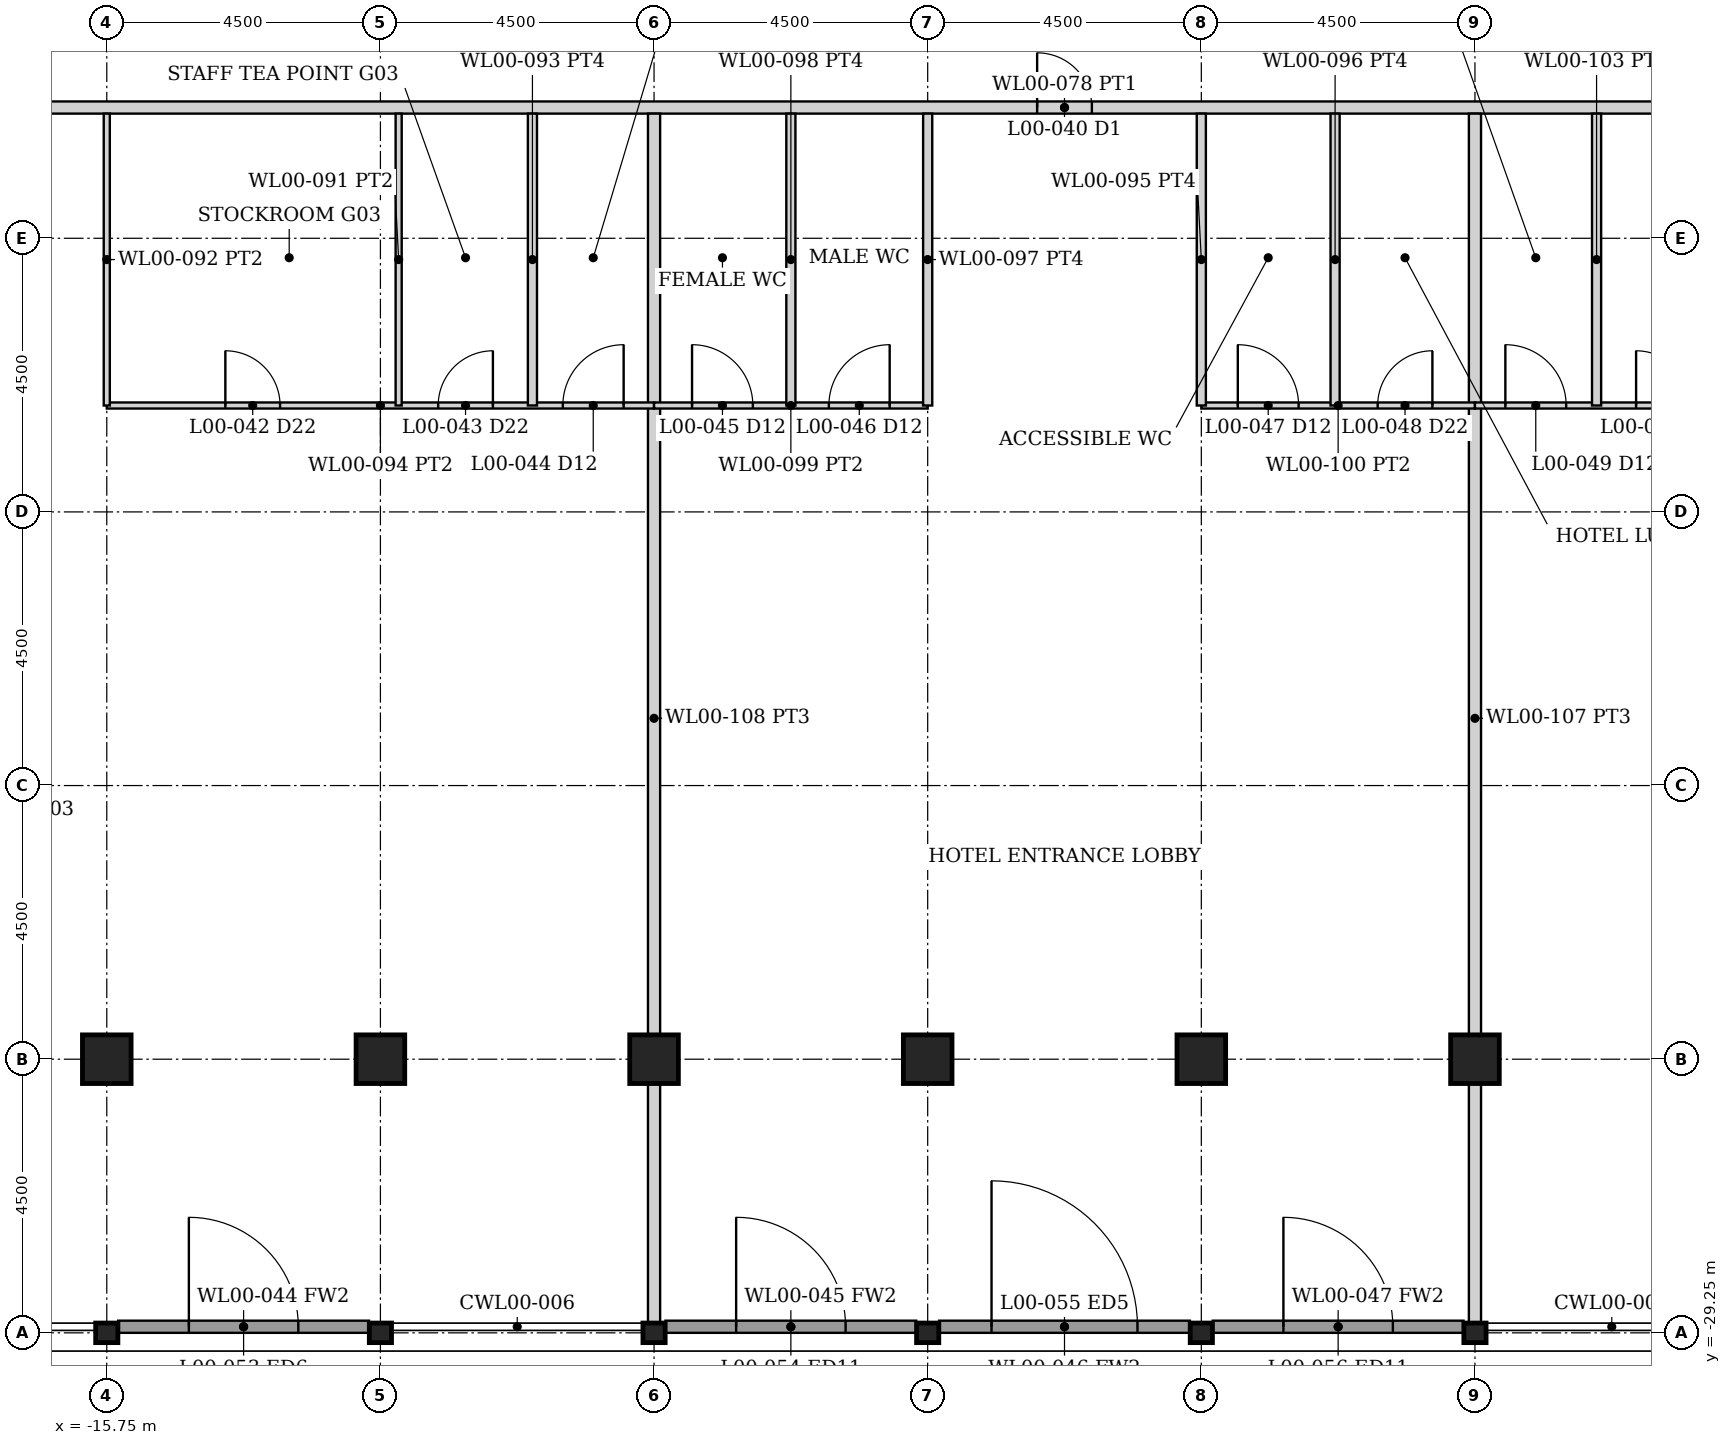
"""IFC4 building model, lengths in metres.
Left out: names, types, materials, properties, quantities, classifications, styles, units other than length and angle.
Written with IfcOpenShell. Run it as: python <this file> out.ifc"""

import sys

from ifc_helpers import new_model, si_unit, direction, frame, frame_2d, origin, origin_2d, place, context, subcontext, project, spatial, rectangle, hollow_rectangle, i_section, extrude, element, fill, save


model = new_model("IFC4")
c1 = context("Model", 3, precision=1e-05, world=origin(), true_north=direction((0.0, 1.0)))
c2 = subcontext(c1, "Body", "Model", "MODEL_VIEW")
j1 = project(units=[si_unit("LENGTHUNIT", "METRE"), si_unit("PLANEANGLEUNIT", "RADIAN")], contexts=[c1])
p1 = place(None, origin())
s1 = spatial("IfcSite", under=j1, at=p1, CompositionType="ELEMENT")
p2 = place(p1, origin())
s2 = spatial("IfcBuilding", under=s1, at=p2, CompositionType="ELEMENT")
p3 = place(p2, origin())
s3 = spatial("IfcBuildingStorey", under=s2, at=p3, CompositionType="ELEMENT", Elevation=0.0)
for number, where, z_axis, x_axis in (
    (1, (-15.75, -24.75, -0.3), (0.0, 0.0, 1.0), (0.0, 1.0, 0.0)),
    (2, (-11.25, -24.75, -0.3), (0.0, 0.0, 1.0), (0.0, 1.0, 0.0)),
    (3, (-6.75, -24.75, -0.3), (0.0, 0.0, 1.0), (0.0, 1.0, 0.0)),
    (4, (-2.25, -24.75, -0.3), (0.0, 0.0, 1.0), (0.0, 1.0, 0.0)),
    (5, (2.25, -24.75, -0.3), (0.0, 0.0, 1.0), (0.0, 1.0, 0.0)),
    (6, (6.75, -24.75, -0.3), (0.0, 0.0, 1.0), (0.0, 1.0, 0.0)),
):
    element("IfcColumn", number, at=place(p3, frame(where, z_axis=z_axis, x_axis=x_axis)), inside=s3, PredefinedType="COLUMN", context=c2, shape_type="SweptSolid", body=[
        extrude(hollow_rectangle(XDim=0.8, YDim=0.8, WallThickness=0.08, at=origin_2d()), origin(), (0.0, 0.0, 1.0), 6.3),
    ])
for number, where, z_axis, x_axis in (
    (7, (-15.75, -29.25, -0.3), (0.0, 0.0, 1.0), (0.0, 1.0, 0.0)),
    (8, (-11.25, -29.25, -0.3), (0.0, 0.0, 1.0), (0.0, 1.0, 0.0)),
    (9, (-6.75, -29.25, -0.3), (0.0, 0.0, 1.0), (0.0, 1.0, 0.0)),
    (10, (-2.25, -29.25, -0.3), (0.0, 0.0, 1.0), (0.0, 1.0, 0.0)),
    (11, (2.25, -29.25, -0.3), (0.0, 0.0, 1.0), (0.0, 1.0, 0.0)),
    (12, (6.75, -29.25, -0.3), (0.0, 0.0, 1.0), (0.0, 1.0, 0.0)),
):
    element("IfcColumn", number, at=place(p3, frame(where, z_axis=z_axis, x_axis=x_axis)), inside=s3, PredefinedType="COLUMN", context=c2, shape_type="SweptSolid", body=[
        extrude(i_section(OverallWidth=0.322, OverallDepth=0.365, WebThickness=0.027, FlangeThickness=0.044, FilletRadius=0.015, at=origin_2d()), origin(), (0.0, 0.0, 1.0), 6.3),
    ])
p4 = place(p3, frame((-15.562, -29.15, 0.0), z_axis=(0.0, 0.0, 1.0), x_axis=(1.0, 0.0, 0.0)))
e13 = element("IfcWall", 13, at=p4, inside=s3, PredefinedType="SOLIDWALL", context=c2, shape_type="SweptSolid", body=[
    extrude(rectangle(XDim=4.125, YDim=0.2, at=frame_2d((2.062, 0.0))), origin(), (0.0, 0.0, 1.0), 5.133),
])
p5 = place(p4, frame((1.162, 0.0, 0.0)))
e14 = element("IfcOpeningElement", 14, at=p5, cuts=e13, PredefinedType="OPENING", context=c2, shape_type="SweptSolid", body=[
    extrude(rectangle(XDim=1.8, YDim=2.7, at=frame_2d((0.9, 1.35))), frame((0.0, 0.11, 0.0), z_axis=(0.0, -1.0, 0.0), x_axis=(1.0, 0.0, 0.0)), (0.0, 0.0, 1.0), 0.22),
])
p6 = place(p3, frame((-6.562, -29.15, 0.0), z_axis=(0.0, 0.0, 1.0), x_axis=(1.0, 0.0, 0.0)))
e15 = element("IfcWall", 15, at=p6, inside=s3, PredefinedType="SOLIDWALL", context=c2, shape_type="SweptSolid", body=[
    extrude(rectangle(XDim=4.125, YDim=0.2, at=frame_2d((2.062, 0.0))), origin(), (0.0, 0.0, 1.0), 5.133),
])
p7 = place(p6, frame((1.162, 0.0, 0.0)))
e16 = element("IfcOpeningElement", 16, at=p7, cuts=e15, PredefinedType="OPENING", context=c2, shape_type="SweptSolid", body=[
    extrude(rectangle(XDim=1.8, YDim=2.7, at=frame_2d((0.9, 1.35))), frame((0.0, 0.11, 0.0), z_axis=(0.0, -1.0, 0.0), x_axis=(1.0, 0.0, 0.0)), (0.0, 0.0, 1.0), 0.22),
])
p8 = place(p3, frame((-2.062, -29.15, 0.0), z_axis=(0.0, 0.0, 1.0), x_axis=(1.0, 0.0, 0.0)))
e17 = element("IfcWall", 17, at=p8, inside=s3, PredefinedType="SOLIDWALL", context=c2, shape_type="SweptSolid", body=[
    extrude(rectangle(XDim=4.125, YDim=0.2, at=frame_2d((2.062, 0.0))), origin(), (0.0, 0.0, 1.0), 5.133),
])
p9 = place(p8, frame((0.862, 0.0, 0.0)))
e18 = element("IfcOpeningElement", 18, at=p9, cuts=e17, PredefinedType="OPENING", context=c2, shape_type="SweptSolid", body=[
    extrude(rectangle(XDim=2.4, YDim=2.7, at=frame_2d((1.2, 1.35))), frame((0.0, 0.11, 0.0), z_axis=(0.0, -1.0, 0.0), x_axis=(1.0, 0.0, 0.0)), (0.0, 0.0, 1.0), 0.22),
])
p10 = place(p3, frame((2.438, -29.15, 0.0), z_axis=(0.0, 0.0, 1.0), x_axis=(1.0, 0.0, 0.0)))
e19 = element("IfcWall", 19, at=p10, inside=s3, PredefinedType="SOLIDWALL", context=c2, shape_type="SweptSolid", body=[
    extrude(rectangle(XDim=4.125, YDim=0.2, at=frame_2d((2.062, 0.0))), origin(), (0.0, 0.0, 1.0), 5.133),
])
p11 = place(p10, frame((1.162, 0.0, 0.0)))
e20 = element("IfcOpeningElement", 20, at=p11, cuts=e19, PredefinedType="OPENING", context=c2, shape_type="SweptSolid", body=[
    extrude(rectangle(XDim=1.8, YDim=2.7, at=frame_2d((0.9, 1.35))), frame((0.0, 0.11, 0.0), z_axis=(0.0, -1.0, 0.0), x_axis=(1.0, 0.0, 0.0)), (0.0, 0.0, 1.0), 0.22),
])
p12 = place(p3, frame((-25.075, -9.1, 0.0), z_axis=(0.0, 0.0, 1.0), x_axis=(1.0, 0.0, 0.0)))
e21 = element("IfcWall", 21, at=p12, inside=s3, PredefinedType="PARTITIONING", context=c2, shape_type="SweptSolid", body=[
    extrude(rectangle(XDim=50.15, YDim=0.2, at=frame_2d((25.075, 0.0))), origin(), (0.0, 0.0, 1.0), 4.829),
])
p13 = place(p12, frame((6.85, 0.0, 0.0)))
e22 = element("IfcOpeningElement", 22, at=p13, cuts=e21, PredefinedType="OPENING", context=c2, shape_type="SweptSolid", body=[
    extrude(rectangle(XDim=0.9, YDim=2.1, at=frame_2d((0.45, 1.05))), frame((0.0, 0.11, 0.0), z_axis=(0.0, -1.0, 0.0), x_axis=(1.0, 0.0, 0.0)), (0.0, 0.0, 1.0), 0.22),
])
p14 = place(p12, frame((24.625, 0.0, 0.0)))
e23 = element("IfcOpeningElement", 23, at=p14, cuts=e21, PredefinedType="OPENING", context=c2, shape_type="SweptSolid", body=[
    extrude(rectangle(XDim=0.9, YDim=2.1, at=frame_2d((0.45, 1.05))), frame((0.0, 0.11, 0.0), z_axis=(0.0, -1.0, 0.0), x_axis=(1.0, 0.0, 0.0)), (0.0, 0.0, 1.0), 0.22),
])
p15 = place(p12, frame((42.4, 0.0, 0.0)))
e24 = element("IfcOpeningElement", 24, at=p15, cuts=e21, PredefinedType="OPENING", context=c2, shape_type="SweptSolid", body=[
    extrude(rectangle(XDim=0.9, YDim=2.1, at=frame_2d((0.45, 1.05))), frame((0.0, 0.11, 0.0), z_axis=(0.0, -1.0, 0.0), x_axis=(1.0, 0.0, 0.0)), (0.0, 0.0, 1.0), 0.22),
])
for number, where, z_axis, x_axis in (
    (25, (-6.75, -29.089, 0.0), (0.0, 0.0, 1.0), (0.0, 1.0, 0.0)),
    (26, (6.75, -29.089, 0.0), (0.0, 0.0, 1.0), (0.0, 1.0, 0.0)),
):
    element("IfcWall", number, at=place(p3, frame(where, z_axis=z_axis, x_axis=x_axis)), inside=s3, PredefinedType="PARTITIONING", context=c2, shape_type="SweptSolid", body=[
        extrude(rectangle(XDim=19.889, YDim=0.2, at=frame_2d((9.944, 0.0))), origin(), (0.0, 0.0, 1.0), 4.829),
    ])
p16 = place(p3, frame((-15.75, -14.0, 0.0), z_axis=(0.0, 0.0, 1.0), x_axis=(1.0, 0.0, 0.0)))
e27 = element("IfcWall", 27, at=p16, inside=s3, PredefinedType="PARTITIONING", context=c2, shape_type="SweptSolid", body=[
    extrude(rectangle(XDim=9.0, YDim=0.1, at=frame_2d((4.5, 0.0))), origin(), (0.0, 0.0, 1.0), 4.829),
])
p17 = place(p16, frame((1.95, 0.0, 0.0)))
e28 = element("IfcOpeningElement", 28, at=p17, cuts=e27, PredefinedType="OPENING", context=c2, shape_type="SweptSolid", body=[
    extrude(rectangle(XDim=0.9, YDim=2.1, at=frame_2d((0.45, 1.05))), frame((0.0, 0.06, 0.0), z_axis=(0.0, -1.0, 0.0), x_axis=(1.0, 0.0, 0.0)), (0.0, 0.0, 1.0), 0.12),
])
p18 = place(p16, frame((5.45, 0.0, 0.0)))
e29 = element("IfcOpeningElement", 29, at=p18, cuts=e27, PredefinedType="OPENING", context=c2, shape_type="SweptSolid", body=[
    extrude(rectangle(XDim=0.9, YDim=2.1, at=frame_2d((0.45, 1.05))), frame((0.0, 0.06, 0.0), z_axis=(0.0, -1.0, 0.0), x_axis=(1.0, 0.0, 0.0)), (0.0, 0.0, 1.0), 0.12),
])
p19 = place(p16, frame((7.5, 0.0, 0.0)))
e30 = element("IfcOpeningElement", 30, at=p19, cuts=e27, PredefinedType="OPENING", context=c2, shape_type="SweptSolid", body=[
    extrude(rectangle(XDim=1.0, YDim=2.1, at=frame_2d((0.5, 1.05))), frame((0.0, 0.06, 0.0), z_axis=(0.0, -1.0, 0.0), x_axis=(1.0, 0.0, 0.0)), (0.0, 0.0, 1.0), 0.12),
])
for number, where, z_axis, x_axis in (
    (31, (-15.75, -14.0, 0.0), (0.0, 0.0, 1.0), (0.0, 1.0, 0.0)),
    (32, (-10.95, -14.0, 0.0), (0.0, 0.0, 1.0), (0.0, 1.0, 0.0)),
):
    element("IfcWall", number, at=place(p3, frame(where, z_axis=z_axis, x_axis=x_axis)), inside=s3, PredefinedType="PARTITIONING", context=c2, shape_type="SweptSolid", body=[
        extrude(rectangle(XDim=4.8, YDim=0.1, at=frame_2d((2.4, 0.0))), origin(), (0.0, 0.0, 1.0), 4.829),
    ])
p20 = place(p3, frame((-8.75, -14.0, 0.0), z_axis=(0.0, 0.0, 1.0), x_axis=(0.0, 1.0, 0.0)))
e33 = element("IfcWall", 33, at=p20, inside=s3, PredefinedType="PARTITIONING", context=c2, shape_type="SweptSolid", body=[
    extrude(rectangle(XDim=4.8, YDim=0.15, at=frame_2d((2.4, 0.0))), origin(), (0.0, 0.0, 1.0), 4.829),
])
p21 = place(p3, frame((-6.75, -14.0, 0.0), z_axis=(0.0, 0.0, 1.0), x_axis=(1.0, 0.0, 0.0)))
e34 = element("IfcWall", 34, at=p21, inside=s3, PredefinedType="PARTITIONING", context=c2, shape_type="SweptSolid", body=[
    extrude(rectangle(XDim=4.5, YDim=0.1, at=frame_2d((2.25, 0.0))), origin(), (0.0, 0.0, 1.0), 4.829),
])
p22 = place(p21, frame((0.625, 0.0, 0.0)))
e35 = element("IfcOpeningElement", 35, at=p22, cuts=e34, PredefinedType="OPENING", context=c2, shape_type="SweptSolid", body=[
    extrude(rectangle(XDim=1.0, YDim=2.1, at=frame_2d((0.5, 1.05))), frame((0.0, 0.06, 0.0), z_axis=(0.0, -1.0, 0.0), x_axis=(1.0, 0.0, 0.0)), (0.0, 0.0, 1.0), 0.12),
])
p23 = place(p21, frame((2.875, 0.0, 0.0)))
e36 = element("IfcOpeningElement", 36, at=p23, cuts=e34, PredefinedType="OPENING", context=c2, shape_type="SweptSolid", body=[
    extrude(rectangle(XDim=1.0, YDim=2.1, at=frame_2d((0.5, 1.05))), frame((0.0, 0.06, 0.0), z_axis=(0.0, -1.0, 0.0), x_axis=(1.0, 0.0, 0.0)), (0.0, 0.0, 1.0), 0.12),
])
p24 = place(p3, frame((2.25, -14.0, 0.0), z_axis=(0.0, 0.0, 1.0), x_axis=(1.0, 0.0, 0.0)))
e37 = element("IfcWall", 37, at=p24, inside=s3, PredefinedType="PARTITIONING", context=c2, shape_type="SweptSolid", body=[
    extrude(rectangle(XDim=4.5, YDim=0.1, at=frame_2d((2.25, 0.0))), origin(), (0.0, 0.0, 1.0), 4.829),
])
p25 = place(p24, frame((0.6, 0.0, 0.0)))
e38 = element("IfcOpeningElement", 38, at=p25, cuts=e37, PredefinedType="OPENING", context=c2, shape_type="SweptSolid", body=[
    extrude(rectangle(XDim=1.0, YDim=2.1, at=frame_2d((0.5, 1.05))), frame((0.0, 0.06, 0.0), z_axis=(0.0, -1.0, 0.0), x_axis=(1.0, 0.0, 0.0)), (0.0, 0.0, 1.0), 0.12),
])
p26 = place(p24, frame((2.9, 0.0, 0.0)))
e39 = element("IfcOpeningElement", 39, at=p26, cuts=e37, PredefinedType="OPENING", context=c2, shape_type="SweptSolid", body=[
    extrude(rectangle(XDim=0.9, YDim=2.1, at=frame_2d((0.45, 1.05))), frame((0.0, 0.06, 0.0), z_axis=(0.0, -1.0, 0.0), x_axis=(1.0, 0.0, 0.0)), (0.0, 0.0, 1.0), 0.12),
])
for number, where, z_axis, x_axis in (
    (40, (-4.5, -14.0, 0.0), (0.0, 0.0, 1.0), (0.0, 1.0, 0.0)),
    (41, (-2.25, -14.0, 0.0), (0.0, 0.0, 1.0), (0.0, 1.0, 0.0)),
    (42, (2.25, -14.0, 0.0), (0.0, 0.0, 1.0), (0.0, 1.0, 0.0)),
    (43, (4.45, -14.0, 0.0), (0.0, 0.0, 1.0), (0.0, 1.0, 0.0)),
):
    element("IfcWall", number, at=place(p3, frame(where, z_axis=z_axis, x_axis=x_axis)), inside=s3, PredefinedType="PARTITIONING", context=c2, shape_type="SweptSolid", body=[
        extrude(rectangle(XDim=4.8, YDim=0.15, at=frame_2d((2.4, 0.0))), origin(), (0.0, 0.0, 1.0), 4.829),
    ])
p27 = place(p3, frame((6.75, -14.0, 0.0), z_axis=(0.0, 0.0, 1.0), x_axis=(1.0, 0.0, 0.0)))
e44 = element("IfcWall", 44, at=p27, inside=s3, PredefinedType="PARTITIONING", context=c2, shape_type="SweptSolid", body=[
    extrude(rectangle(XDim=9.0, YDim=0.1, at=frame_2d((4.5, 0.0))), origin(), (0.0, 0.0, 1.0), 4.829),
])
p28 = place(p27, frame((6.15, 0.0, 0.0)))
e45 = element("IfcOpeningElement", 45, at=p28, cuts=e44, PredefinedType="OPENING", context=c2, shape_type="SweptSolid", body=[
    extrude(rectangle(XDim=0.9, YDim=2.1, at=frame_2d((0.45, 1.05))), frame((0.0, 0.06, 0.0), z_axis=(0.0, -1.0, 0.0), x_axis=(1.0, 0.0, 0.0)), (0.0, 0.0, 1.0), 0.12),
])
p29 = place(p27, frame((2.65, 0.0, 0.0)))
e46 = element("IfcOpeningElement", 46, at=p29, cuts=e44, PredefinedType="OPENING", context=c2, shape_type="SweptSolid", body=[
    extrude(rectangle(XDim=0.9, YDim=2.1, at=frame_2d((0.45, 1.05))), frame((0.0, 0.06, 0.0), z_axis=(0.0, -1.0, 0.0), x_axis=(1.0, 0.0, 0.0)), (0.0, 0.0, 1.0), 0.12),
])
p30 = place(p27, frame((0.5, 0.0, 0.0)))
e47 = element("IfcOpeningElement", 47, at=p30, cuts=e44, PredefinedType="OPENING", context=c2, shape_type="SweptSolid", body=[
    extrude(rectangle(XDim=1.0, YDim=2.1, at=frame_2d((0.5, 1.05))), frame((0.0, 0.06, 0.0), z_axis=(0.0, -1.0, 0.0), x_axis=(1.0, 0.0, 0.0)), (0.0, 0.0, 1.0), 0.12),
])
p31 = place(p3, frame((8.75, -14.0, 0.0), z_axis=(0.0, 0.0, 1.0), x_axis=(0.0, 1.0, 0.0)))
e48 = element("IfcWall", 48, at=p31, inside=s3, PredefinedType="PARTITIONING", context=c2, shape_type="SweptSolid", body=[
    extrude(rectangle(XDim=4.8, YDim=0.15, at=frame_2d((2.4, 0.0))), origin(), (0.0, 0.0, 1.0), 4.829),
])
p32 = place(p5, origin())
e49 = element("IfcDoor", 49, at=p32, inside=s3, OperationType="DOUBLE_DOOR_SINGLE_SWING", PredefinedType="DOOR", context=c2, shape_type="SweptSolid", body=[
    extrude(rectangle(XDim=1.8, YDim=2.7, at=frame_2d((0.9, 1.35))), frame((0.0, 0.025, 0.0), z_axis=(0.0, -1.0, 0.0), x_axis=(1.0, 0.0, 0.0)), (0.0, 0.0, 1.0), 0.05),
])
fill(e14, e49)
p33 = place(p7, origin())
e50 = element("IfcDoor", 50, at=p33, inside=s3, OperationType="DOUBLE_DOOR_SINGLE_SWING", PredefinedType="DOOR", context=c2, shape_type="SweptSolid", body=[
    extrude(rectangle(XDim=1.8, YDim=2.7, at=frame_2d((0.9, 1.35))), frame((0.0, 0.025, 0.0), z_axis=(0.0, -1.0, 0.0), x_axis=(1.0, 0.0, 0.0)), (0.0, 0.0, 1.0), 0.05),
])
fill(e16, e50)
p34 = place(p9, origin())
e51 = element("IfcDoor", 51, at=p34, inside=s3, OperationType="DOUBLE_DOOR_SINGLE_SWING", PredefinedType="DOOR", context=c2, shape_type="SweptSolid", body=[
    extrude(rectangle(XDim=2.4, YDim=2.7, at=frame_2d((1.2, 1.35))), frame((0.0, 0.025, 0.0), z_axis=(0.0, -1.0, 0.0), x_axis=(1.0, 0.0, 0.0)), (0.0, 0.0, 1.0), 0.05),
])
fill(e18, e51)
p35 = place(p11, origin())
e52 = element("IfcDoor", 52, at=p35, inside=s3, OperationType="DOUBLE_DOOR_SINGLE_SWING", PredefinedType="DOOR", context=c2, shape_type="SweptSolid", body=[
    extrude(rectangle(XDim=1.8, YDim=2.7, at=frame_2d((0.9, 1.35))), frame((0.0, 0.025, 0.0), z_axis=(0.0, -1.0, 0.0), x_axis=(1.0, 0.0, 0.0)), (0.0, 0.0, 1.0), 0.05),
])
fill(e20, e52)
p36 = place(p17, origin())
e53 = element("IfcDoor", 53, at=p36, inside=s3, OperationType="SINGLE_SWING_LEFT", PredefinedType="DOOR", context=c2, shape_type="SweptSolid", body=[
    extrude(rectangle(XDim=0.9, YDim=2.1, at=frame_2d((0.45, 1.05))), frame((0.0, 0.025, 0.0), z_axis=(0.0, -1.0, 0.0), x_axis=(1.0, 0.0, 0.0)), (0.0, 0.0, 1.0), 0.05),
])
fill(e28, e53)
p37 = place(p18, origin())
e54 = element("IfcDoor", 54, at=p37, inside=s3, OperationType="SINGLE_SWING_RIGHT", PredefinedType="DOOR", context=c2, shape_type="SweptSolid", body=[
    extrude(rectangle(XDim=0.9, YDim=2.1, at=frame_2d((0.45, 1.05))), frame((0.0, 0.025, 0.0), z_axis=(0.0, -1.0, 0.0), x_axis=(1.0, 0.0, 0.0)), (0.0, 0.0, 1.0), 0.05),
])
fill(e29, e54)
p38 = place(p19, origin())
e55 = element("IfcDoor", 55, at=p38, inside=s3, OperationType="SINGLE_SWING_RIGHT", PredefinedType="DOOR", context=c2, shape_type="SweptSolid", body=[
    extrude(rectangle(XDim=1.0, YDim=2.1, at=frame_2d((0.5, 1.05))), frame((0.0, 0.025, 0.0), z_axis=(0.0, -1.0, 0.0), x_axis=(1.0, 0.0, 0.0)), (0.0, 0.0, 1.0), 0.05),
])
fill(e30, e55)
p39 = place(p22, origin())
e56 = element("IfcDoor", 56, at=p39, inside=s3, OperationType="SINGLE_SWING_LEFT", PredefinedType="DOOR", context=c2, shape_type="SweptSolid", body=[
    extrude(rectangle(XDim=1.0, YDim=2.1, at=frame_2d((0.5, 1.05))), frame((0.0, 0.025, 0.0), z_axis=(0.0, -1.0, 0.0), x_axis=(1.0, 0.0, 0.0)), (0.0, 0.0, 1.0), 0.05),
])
fill(e35, e56)
p40 = place(p23, origin())
e57 = element("IfcDoor", 57, at=p40, inside=s3, OperationType="SINGLE_SWING_RIGHT", PredefinedType="DOOR", context=c2, shape_type="SweptSolid", body=[
    extrude(rectangle(XDim=1.0, YDim=2.1, at=frame_2d((0.5, 1.05))), frame((0.0, 0.025, 0.0), z_axis=(0.0, -1.0, 0.0), x_axis=(1.0, 0.0, 0.0)), (0.0, 0.0, 1.0), 0.05),
])
fill(e36, e57)
p41 = place(p25, origin())
e58 = element("IfcDoor", 58, at=p41, inside=s3, OperationType="SINGLE_SWING_LEFT", PredefinedType="DOOR", context=c2, shape_type="SweptSolid", body=[
    extrude(rectangle(XDim=1.0, YDim=2.1, at=frame_2d((0.5, 1.05))), frame((0.0, 0.025, 0.0), z_axis=(0.0, -1.0, 0.0), x_axis=(1.0, 0.0, 0.0)), (0.0, 0.0, 1.0), 0.05),
])
fill(e38, e58)
p42 = place(p26, origin())
e59 = element("IfcDoor", 59, at=p42, inside=s3, OperationType="SINGLE_SWING_RIGHT", PredefinedType="DOOR", context=c2, shape_type="SweptSolid", body=[
    extrude(rectangle(XDim=0.9, YDim=2.1, at=frame_2d((0.45, 1.05))), frame((0.0, 0.025, 0.0), z_axis=(0.0, -1.0, 0.0), x_axis=(1.0, 0.0, 0.0)), (0.0, 0.0, 1.0), 0.05),
])
fill(e39, e59)
p43 = place(p14, origin())
e60 = element("IfcDoor", 60, at=p43, inside=s3, OperationType="SINGLE_SWING_LEFT", PredefinedType="DOOR", context=c2, shape_type="SweptSolid", body=[
    extrude(rectangle(XDim=0.9, YDim=2.1, at=frame_2d((0.45, 1.05))), frame((0.0, 0.025, 0.0), z_axis=(0.0, -1.0, 0.0), x_axis=(1.0, 0.0, 0.0)), (0.0, 0.0, 1.0), 0.05),
])
fill(e23, e60)
p44 = place(p29, origin())
e61 = element("IfcDoor", 61, at=p44, inside=s3, OperationType="SINGLE_SWING_LEFT", PredefinedType="DOOR", context=c2, shape_type="SweptSolid", body=[
    extrude(rectangle(XDim=0.9, YDim=2.1, at=frame_2d((0.45, 1.05))), frame((0.0, 0.025, 0.0), z_axis=(0.0, -1.0, 0.0), x_axis=(1.0, 0.0, 0.0)), (0.0, 0.0, 1.0), 0.05),
])
fill(e46, e61)
p45 = place(p30, origin())
e62 = element("IfcDoor", 62, at=p45, inside=s3, OperationType="SINGLE_SWING_LEFT", PredefinedType="DOOR", context=c2, shape_type="SweptSolid", body=[
    extrude(rectangle(XDim=1.0, YDim=2.1, at=frame_2d((0.5, 1.05))), frame((0.0, 0.025, 0.0), z_axis=(0.0, -1.0, 0.0), x_axis=(1.0, 0.0, 0.0)), (0.0, 0.0, 1.0), 0.05),
])
fill(e47, e62)
save(model, sys.argv[1])
